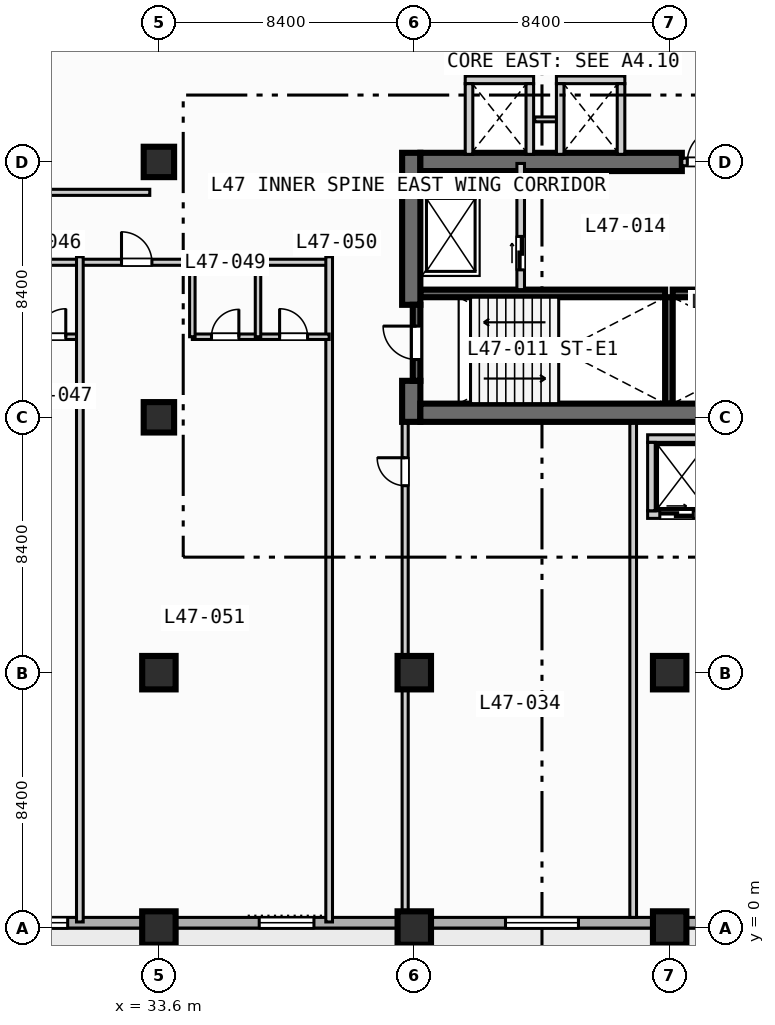
"""IFC4 building model, lengths in metres.
Left out: names, types, materials, properties, quantities, classifications, styles, units other than length and angle.
Written with IfcOpenShell. Run it as: python <this file> out.ifc"""

import sys

from ifc_helpers import new_model, si_unit, direction, frame, frame_2d, origin, origin_2d, place, context, subcontext, project, spatial, rectangle, extrude, element, fill, save


model = new_model("IFC4")
c1 = context("Model", 3, precision=1e-05, world=origin(), true_north=direction((0.0, 1.0)))
c2 = subcontext(c1, "Body", "Model", "MODEL_VIEW")
j1 = project(units=[si_unit("LENGTHUNIT", "METRE"), si_unit("PLANEANGLEUNIT", "RADIAN")], contexts=[c1])
p1 = place(None, origin())
s1 = spatial("IfcSite", under=j1, at=p1, CompositionType="ELEMENT")
p2 = place(p1, origin())
s2 = spatial("IfcBuilding", under=s1, at=p2, CompositionType="ELEMENT")
p3 = place(p2, frame((0.0, 0.0, 193.9)))
s3 = spatial("IfcBuildingStorey", under=s2, at=p3, CompositionType="ELEMENT", Elevation=193.9)
for number, where, z_axis, x_axis in (
    (1, (42.2, 20.875, 0.0), (0.0, 0.0, 1.0), (1.0, 0.0, 0.0)),
    (2, (50.5, 20.875, 0.0), (0.0, 0.0, 1.0), (1.0, 0.0, 0.0)),
):
    element("IfcWall", number, at=place(p3, frame(where, z_axis=z_axis, x_axis=x_axis)), inside=s3, PredefinedType="SOLIDWALL", context=c2, shape_type="SweptSolid", body=[
        extrude(rectangle(XDim=8.05, YDim=0.25, at=frame_2d((4.025, 0.0))), origin(), (0.0, 0.0, 1.0), 3.47),
    ])
p4 = place(p3, frame((50.375, 17.25, 0.0), z_axis=(0.0, 0.0, 1.0), x_axis=(0.0, 1.0, 0.0)))
e3 = element("IfcWall", 3, at=p4, inside=s3, PredefinedType="SOLIDWALL", context=c2, shape_type="SweptSolid", body=[
    extrude(rectangle(XDim=3.5, YDim=0.25, at=frame_2d((1.75, 0.0))), origin(), (0.0, 0.0, 1.0), 3.47),
])
p5 = place(p3, frame((41.9, 16.65, 0.0), z_axis=(0.0, 0.0, 1.0), x_axis=(0.0, 1.0, 0.0)))
e4 = element("IfcWall", 4, at=p5, inside=s3, PredefinedType="SHEAR", context=c2, shape_type="SweptSolid", body=[
    extrude(rectangle(XDim=1.35, YDim=0.6, at=frame_2d((0.675, 0.0))), origin(), (0.0, 0.0, 1.0), 3.47),
])
p6 = place(p3, frame((41.9, 20.5, 0.0), z_axis=(0.0, 0.0, 1.0), x_axis=(0.0, 1.0, 0.0)))
e5 = element("IfcWall", 5, at=p6, inside=s3, PredefinedType="SHEAR", context=c2, shape_type="SweptSolid", body=[
    extrude(rectangle(XDim=5.0, YDim=0.6, at=frame_2d((2.5, 0.0))), origin(), (0.0, 0.0, 1.0), 3.47),
])
p7 = place(p3, frame((42.2, 16.95, 0.0), z_axis=(0.0, 0.0, 1.0), x_axis=(1.0, 0.0, 0.0)))
e6 = element("IfcWall", 6, at=p7, inside=s3, PredefinedType="SHEAR", context=c2, shape_type="SweptSolid", body=[
    extrude(rectangle(XDim=16.35, YDim=0.6, at=frame_2d((8.175, 0.0))), origin(), (0.0, 0.0, 1.0), 3.47),
])
p8 = place(p3, frame((42.2, 25.2, 0.0), z_axis=(0.0, 0.0, 1.0), x_axis=(1.0, 0.0, 0.0)))
e7 = element("IfcWall", 7, at=p8, inside=s3, PredefinedType="SHEAR", context=c2, shape_type="SweptSolid", body=[
    extrude(rectangle(XDim=8.6, YDim=0.6, at=frame_2d((4.3, 0.0))), origin(), (0.0, 0.0, 1.0), 3.47),
])
for number, where, z_axis, x_axis in (
    (8, (33.6, 0.0, 0.0), (0.0, 0.0, 1.0), (1.0, 0.0, 0.0)),
    (9, (33.6, 8.4, 0.0), (0.0, 0.0, 1.0), (1.0, 0.0, 0.0)),
):
    element("IfcColumn", number, at=place(p3, frame(where, z_axis=z_axis, x_axis=x_axis)), inside=s3, PredefinedType="COLUMN", context=c2, shape_type="SweptSolid", body=[
        extrude(rectangle(XDim=1.1, YDim=1.1, at=origin_2d()), origin(), (0.0, 0.0, 1.0), 3.7),
    ])
for number, where, z_axis, x_axis in (
    (10, (33.6, 16.8, 0.0), (0.0, 0.0, 1.0), (1.0, 0.0, 0.0)),
    (11, (33.6, 25.2, 0.0), (0.0, 0.0, 1.0), (1.0, 0.0, 0.0)),
):
    element("IfcColumn", number, at=place(p3, frame(where, z_axis=z_axis, x_axis=x_axis)), inside=s3, PredefinedType="COLUMN", context=c2, shape_type="SweptSolid", body=[
        extrude(rectangle(XDim=1.0, YDim=1.0, at=origin_2d()), origin(), (0.0, 0.0, 1.0), 3.7),
    ])
for number, where, z_axis, x_axis in (
    (12, (42.0, 0.0, 0.0), (0.0, 0.0, 1.0), (1.0, 0.0, 0.0)),
    (13, (42.0, 8.4, 0.0), (0.0, 0.0, 1.0), (1.0, 0.0, 0.0)),
    (14, (50.4, 0.0, 0.0), (0.0, 0.0, 1.0), (1.0, 0.0, 0.0)),
    (15, (50.4, 8.4, 0.0), (0.0, 0.0, 1.0), (1.0, 0.0, 0.0)),
):
    element("IfcColumn", number, at=place(p3, frame(where, z_axis=z_axis, x_axis=x_axis)), inside=s3, PredefinedType="COLUMN", context=c2, shape_type="SweptSolid", body=[
        extrude(rectangle(XDim=1.1, YDim=1.1, at=origin_2d()), origin(), (0.0, 0.0, 1.0), 3.7),
    ])
p9 = place(p3, frame((72.425, 0.175, 0.0), z_axis=(0.0, 0.0, 1.0), x_axis=(-1.0, 0.0, 0.0)))
e16 = element("IfcWall", 16, at=p9, inside=s3, PredefinedType="STANDARD", context=c2, shape_type="SweptSolid", body=[
    extrude(rectangle(XDim=69.25, YDim=0.35, at=frame_2d((34.625, 0.0))), origin(), (0.0, 0.0, 1.0), 3.47),
])
p10 = place(p9, frame((50.725, 0.0, 0.0)))
e17 = element("IfcOpeningElement", 17, at=p10, cuts=e16, PredefinedType="OPENING", context=c2, shape_type="SweptSolid", body=[
    extrude(rectangle(XDim=1.4, YDim=2.2, at=frame_2d((0.7, 1.1))), frame((0.0, 0.185, 0.0), z_axis=(0.0, -1.0, 0.0), x_axis=(1.0, 0.0, 0.0)), (0.0, 0.0, 1.0), 0.37),
])
p11 = place(p9, frame((58.625, 0.0, 0.85)))
e18 = element("IfcOpeningElement", 18, at=p11, cuts=e16, PredefinedType="OPENING", context=c2, shape_type="SweptSolid", body=[
    extrude(rectangle(XDim=2.4, YDim=1.95, at=frame_2d((1.2, 0.975))), frame((0.0, 0.185, 0.0), z_axis=(0.0, -1.0, 0.0), x_axis=(1.0, 0.0, 0.0)), (0.0, 0.0, 1.0), 0.37),
])
p12 = place(p9, frame((41.825, 0.0, 0.85)))
e19 = element("IfcOpeningElement", 19, at=p12, cuts=e16, PredefinedType="OPENING", context=c2, shape_type="SweptSolid", body=[
    extrude(rectangle(XDim=2.4, YDim=1.95, at=frame_2d((1.2, 0.975))), frame((0.0, 0.185, 0.0), z_axis=(0.0, -1.0, 0.0), x_axis=(1.0, 0.0, 0.0)), (0.0, 0.0, 1.0), 0.37),
])
p13 = place(p9, frame((33.725, 0.0, 0.85)))
e20 = element("IfcOpeningElement", 20, at=p13, cuts=e16, PredefinedType="OPENING", context=c2, shape_type="SweptSolid", body=[
    extrude(rectangle(XDim=1.8, YDim=1.8, at=frame_2d((0.9, 0.9))), frame((0.0, 0.185, 0.0), z_axis=(0.0, -1.0, 0.0), x_axis=(1.0, 0.0, 0.0)), (0.0, 0.0, 1.0), 0.37),
])
p14 = place(p9, frame((25.025, 0.0, 0.85)))
e21 = element("IfcOpeningElement", 21, at=p14, cuts=e16, PredefinedType="OPENING", context=c2, shape_type="SweptSolid", body=[
    extrude(rectangle(XDim=2.4, YDim=1.95, at=frame_2d((1.2, 0.975))), frame((0.0, 0.185, 0.0), z_axis=(0.0, -1.0, 0.0), x_axis=(1.0, 0.0, 0.0)), (0.0, 0.0, 1.0), 0.37),
])
p15 = place(p9, frame((64.875, 0.0, 0.85)))
e22 = element("IfcOpeningElement", 22, at=p15, cuts=e16, PredefinedType="OPENING", context=c2, shape_type="SweptSolid", body=[
    extrude(rectangle(XDim=1.8, YDim=1.8, at=frame_2d((0.9, 0.9))), frame((0.0, 0.185, 0.0), z_axis=(0.0, -1.0, 0.0), x_axis=(1.0, 0.0, 0.0)), (0.0, 0.0, 1.0), 0.37),
])
p16 = place(p3, frame((42.075, 18.0, 0.0), z_axis=(0.0, 0.0, 1.0), x_axis=(0.0, 1.0, 0.0)))
e23 = element("IfcWall", 23, at=p16, inside=s3, PredefinedType="SOLIDWALL", context=c2, shape_type="SweptSolid", body=[
    extrude(rectangle(XDim=2.5, YDim=0.25, at=frame_2d((1.25, 0.0))), origin(), (0.0, 0.0, 1.0), 3.47),
])
p17 = place(p16, frame((0.7, 0.0, 0.0)))
e24 = element("IfcOpeningElement", 24, at=p17, cuts=e23, PredefinedType="OPENING", context=c2, shape_type="SweptSolid", body=[
    extrude(rectangle(XDim=1.1, YDim=2.15, at=frame_2d((0.55, 1.075))), frame((0.0, 0.135, 0.0), z_axis=(0.0, -1.0, 0.0), x_axis=(1.0, 0.0, 0.0)), (0.0, 0.0, 1.0), 0.27),
])
p18 = place(p3, frame((45.5, 21.0, 0.0), z_axis=(0.0, 0.0, 1.0), x_axis=(0.0, 1.0, 0.0)))
e25 = element("IfcWall", 25, at=p18, inside=s3, PredefinedType="SOLIDWALL", context=c2, shape_type="SweptSolid", body=[
    extrude(rectangle(XDim=4.15, YDim=0.25, at=frame_2d((2.075, 0.0))), origin(), (0.0, 0.0, 1.0), 3.47),
])
p19 = place(p18, frame((0.65, 0.0, 0.0)))
e26 = element("IfcOpeningElement", 26, at=p19, cuts=e25, PredefinedType="OPENING", context=c2, shape_type="SweptSolid", body=[
    extrude(rectangle(XDim=1.1, YDim=2.15, at=frame_2d((0.55, 1.075))), frame((0.0, 0.135, 0.0), z_axis=(0.0, -1.0, 0.0), x_axis=(1.0, 0.0, 0.0)), (0.0, 0.0, 1.0), 0.27),
])
p20 = place(p3, frame((50.8, 25.2, 0.0), z_axis=(0.0, 0.0, 1.0), x_axis=(1.0, 0.0, 0.0)))
e27 = element("IfcWall", 27, at=p20, inside=s3, PredefinedType="SOLIDWALL", context=c2, shape_type="SweptSolid", body=[
    extrude(rectangle(XDim=1.48, YDim=0.25, at=frame_2d((0.74, 0.0))), origin(), (0.0, 0.0, 1.0), 3.47),
])
p21 = place(p20, frame((0.18, 0.0, 0.0)))
e28 = element("IfcOpeningElement", 28, at=p21, cuts=e27, PredefinedType="OPENING", context=c2, shape_type="SweptSolid", body=[
    extrude(rectangle(XDim=1.1, YDim=2.15, at=frame_2d((0.55, 1.075))), frame((0.0, 0.135, 0.0), z_axis=(0.0, -1.0, 0.0), x_axis=(1.0, 0.0, 0.0)), (0.0, 0.0, 1.0), 0.27),
])
p22 = place(p3, frame((49.675, 13.6, 0.0), z_axis=(0.0, 0.0, 1.0), x_axis=(1.0, 0.0, 0.0)))
e29 = element("IfcWall", 29, at=p22, inside=s3, PredefinedType="SOLIDWALL", context=c2, shape_type="SweptSolid", body=[
    extrude(rectangle(XDim=2.25, YDim=0.25, at=frame_2d((1.125, 0.0))), origin(), (0.0, 0.0, 1.0), 3.47),
])
p23 = place(p22, frame((0.4, 0.0, 0.0)))
e30 = element("IfcOpeningElement", 30, at=p23, cuts=e29, PredefinedType="OPENING", context=c2, shape_type="SweptSolid", body=[
    extrude(rectangle(XDim=1.1, YDim=2.15, at=frame_2d((0.55, 1.075))), frame((0.0, 0.135, 0.0), z_axis=(0.0, -1.0, 0.0), x_axis=(1.0, 0.0, 0.0)), (0.0, 0.0, 1.0), 0.27),
])
for number, where, z_axis, x_axis in (
    (31, (49.675, 16.1, 0.0), (0.0, 0.0, 1.0), (1.0, 0.0, 0.0)),
    (32, (49.8, 13.725, 0.0), (0.0, 0.0, 1.0), (0.0, 1.0, 0.0)),
    (33, (43.675, 27.9, 0.0), (0.0, 0.0, 1.0), (1.0, 0.0, 0.0)),
):
    element("IfcWall", number, at=place(p3, frame(where, z_axis=z_axis, x_axis=x_axis)), inside=s3, PredefinedType="SOLIDWALL", context=c2, shape_type="SweptSolid", body=[
        extrude(rectangle(XDim=2.25, YDim=0.25, at=frame_2d((1.125, 0.0))), origin(), (0.0, 0.0, 1.0), 3.47),
    ])
for number, where, z_axis, x_axis in (
    (34, (43.8, 25.45, 0.0), (0.0, 0.0, 1.0), (0.0, 1.0, 0.0)),
    (35, (45.8, 25.45, 0.0), (0.0, 0.0, 1.0), (0.0, 1.0, 0.0)),
):
    element("IfcWall", number, at=place(p3, frame(where, z_axis=z_axis, x_axis=x_axis)), inside=s3, PredefinedType="SOLIDWALL", context=c2, shape_type="SweptSolid", body=[
        extrude(rectangle(XDim=2.325, YDim=0.25, at=frame_2d((1.163, 0.0))), origin(), (0.0, 0.0, 1.0), 3.47),
    ])
p24 = place(p3, frame((45.96, 26.6, 0.0), z_axis=(0.0, 0.0, 1.0), x_axis=(1.0, 0.0, 0.0)))
e36 = element("IfcWall", 36, at=p24, inside=s3, PredefinedType="PARTITIONING", context=c2, shape_type="SweptSolid", body=[
    extrude(rectangle(XDim=0.88, YDim=0.16, at=frame_2d((0.44, 0.0))), origin(), (0.0, 0.0, 1.0), 3.47),
])
p25 = place(p3, frame((46.675, 27.9, 0.0), z_axis=(0.0, 0.0, 1.0), x_axis=(1.0, 0.0, 0.0)))
e37 = element("IfcWall", 37, at=p25, inside=s3, PredefinedType="SOLIDWALL", context=c2, shape_type="SweptSolid", body=[
    extrude(rectangle(XDim=2.25, YDim=0.25, at=frame_2d((1.125, 0.0))), origin(), (0.0, 0.0, 1.0), 3.47),
])
for number, where, z_axis, x_axis in (
    (38, (46.8, 25.45, 0.0), (0.0, 0.0, 1.0), (0.0, 1.0, 0.0)),
    (39, (48.8, 25.45, 0.0), (0.0, 0.0, 1.0), (0.0, 1.0, 0.0)),
):
    element("IfcWall", number, at=place(p3, frame(where, z_axis=z_axis, x_axis=x_axis)), inside=s3, PredefinedType="SOLIDWALL", context=c2, shape_type="SweptSolid", body=[
        extrude(rectangle(XDim=2.325, YDim=0.25, at=frame_2d((1.163, 0.0))), origin(), (0.0, 0.0, 1.0), 3.47),
    ])
p26 = place(p3, frame((41.7, 0.35, 0.0), z_axis=(0.0, 0.0, 1.0), x_axis=(0.0, 1.0, 0.0)))
e40 = element("IfcWall", 40, at=p26, inside=s3, PredefinedType="PARTITIONING", context=c2, shape_type="SweptSolid", body=[
    extrude(rectangle(XDim=16.25, YDim=0.2, at=frame_2d((8.125, 0.0))), origin(), (0.0, 0.0, 1.0), 2.82),
])
p27 = place(p26, frame((14.2, 0.0, 0.0)))
e41 = element("IfcOpeningElement", 41, at=p27, cuts=e40, PredefinedType="OPENING", context=c2, shape_type="SweptSolid", body=[
    extrude(rectangle(XDim=0.92, YDim=2.1, at=frame_2d((0.46, 1.05))), frame((0.0, 0.11, 0.0), z_axis=(0.0, -1.0, 0.0), x_axis=(1.0, 0.0, 0.0)), (0.0, 0.0, 1.0), 0.22),
])
p28 = place(p3, frame((49.2, 0.35, 0.0), z_axis=(0.0, 0.0, 1.0), x_axis=(0.0, 1.0, 0.0)))
e42 = element("IfcWall", 42, at=p28, inside=s3, PredefinedType="PARTITIONING", context=c2, shape_type="SweptSolid", body=[
    extrude(rectangle(XDim=16.25, YDim=0.22, at=frame_2d((8.125, 0.0))), origin(), (0.0, 0.0, 1.0), 3.47),
])
p29 = place(p3, frame((21.6, 24.2, 0.0), z_axis=(0.0, 0.0, 1.0), x_axis=(1.0, 0.0, 0.0)))
e43 = element("IfcWall", 43, at=p29, inside=s3, PredefinedType="PARTITIONING", context=c2, shape_type="SweptSolid", body=[
    extrude(rectangle(XDim=11.7, YDim=0.2, at=frame_2d((5.85, 0.0))), origin(), (0.0, 0.0, 1.0), 3.47),
])
p30 = place(p3, frame((3.4, 21.9, 0.0), z_axis=(0.0, 0.0, 1.0), x_axis=(1.0, 0.0, 0.0)))
e44 = element("IfcWall", 44, at=p30, inside=s3, PredefinedType="PARTITIONING", context=c2, shape_type="SweptSolid", body=[
    extrude(rectangle(XDim=35.8, YDim=0.2, at=frame_2d((17.9, 0.0))), origin(), (0.0, 0.0, 1.0), 3.47),
])
p31 = place(p30, frame((0.97, 0.0, 0.0)))
e45 = element("IfcOpeningElement", 45, at=p31, cuts=e44, PredefinedType="OPENING", context=c2, shape_type="SweptSolid", body=[
    extrude(rectangle(XDim=1.0, YDim=2.15, at=frame_2d((0.5, 1.075))), frame((0.0, 0.11, 0.0), z_axis=(0.0, -1.0, 0.0), x_axis=(1.0, 0.0, 0.0)), (0.0, 0.0, 1.0), 0.22),
])
p32 = place(p30, frame((7.97, 0.0, 0.0)))
e46 = element("IfcOpeningElement", 46, at=p32, cuts=e44, PredefinedType="OPENING", context=c2, shape_type="SweptSolid", body=[
    extrude(rectangle(XDim=1.0, YDim=2.15, at=frame_2d((0.5, 1.075))), frame((0.0, 0.11, 0.0), z_axis=(0.0, -1.0, 0.0), x_axis=(1.0, 0.0, 0.0)), (0.0, 0.0, 1.0), 0.22),
])
p33 = place(p30, frame((15.37, 0.0, 0.0)))
e47 = element("IfcOpeningElement", 47, at=p33, cuts=e44, PredefinedType="OPENING", context=c2, shape_type="SweptSolid", body=[
    extrude(rectangle(XDim=1.0, YDim=2.15, at=frame_2d((0.5, 1.075))), frame((0.0, 0.11, 0.0), z_axis=(0.0, -1.0, 0.0), x_axis=(1.0, 0.0, 0.0)), (0.0, 0.0, 1.0), 0.22),
])
p34 = place(p30, frame((22.645, 0.0, 0.0)))
e48 = element("IfcOpeningElement", 48, at=p34, cuts=e44, PredefinedType="OPENING", context=c2, shape_type="SweptSolid", body=[
    extrude(rectangle(XDim=1.0, YDim=2.15, at=frame_2d((0.5, 1.075))), frame((0.0, 0.11, 0.0), z_axis=(0.0, -1.0, 0.0), x_axis=(1.0, 0.0, 0.0)), (0.0, 0.0, 1.0), 0.22),
])
p35 = place(p30, frame((28.97, 0.0, 0.0)))
e49 = element("IfcOpeningElement", 49, at=p35, cuts=e44, PredefinedType="OPENING", context=c2, shape_type="SweptSolid", body=[
    extrude(rectangle(XDim=1.0, YDim=2.15, at=frame_2d((0.5, 1.075))), frame((0.0, 0.11, 0.0), z_axis=(0.0, -1.0, 0.0), x_axis=(1.0, 0.0, 0.0)), (0.0, 0.0, 1.0), 0.22),
])
p36 = place(p3, frame((27.45, 19.45, 0.0), z_axis=(0.0, 0.0, 1.0), x_axis=(1.0, 0.0, 0.0)))
e50 = element("IfcWall", 50, at=p36, inside=s3, PredefinedType="PLUMBINGWALL", context=c2, shape_type="SweptSolid", body=[
    extrude(rectangle(XDim=3.55, YDim=0.18, at=frame_2d((1.775, 0.0))), origin(), (0.0, 0.0, 1.0), 3.47),
])
p37 = place(p36, frame((0.402, 0.0, 0.0)))
e51 = element("IfcOpeningElement", 51, at=p37, cuts=e50, PredefinedType="OPENING", context=c2, shape_type="SweptSolid", body=[
    extrude(rectangle(XDim=0.9, YDim=2.1, at=frame_2d((0.45, 1.05))), frame((0.0, 0.1, 0.0), z_axis=(0.0, -1.0, 0.0), x_axis=(1.0, 0.0, 0.0)), (0.0, 0.0, 1.0), 0.2),
])
p38 = place(p36, frame((2.167, 0.0, 0.0)))
e52 = element("IfcOpeningElement", 52, at=p38, cuts=e50, PredefinedType="OPENING", context=c2, shape_type="SweptSolid", body=[
    extrude(rectangle(XDim=0.92, YDim=2.1, at=frame_2d((0.46, 1.05))), frame((0.0, 0.1, 0.0), z_axis=(0.0, -1.0, 0.0), x_axis=(1.0, 0.0, 0.0)), (0.0, 0.0, 1.0), 0.2),
])
for number, where, z_axis, x_axis in (
    (53, (31.0, 0.2, 0.0), (0.0, 0.0, 1.0), (0.0, 1.0, 0.0)),
    (54, (39.2, 0.2, 0.0), (0.0, 0.0, 1.0), (0.0, 1.0, 0.0)),
):
    element("IfcWall", number, at=place(p3, frame(where, z_axis=z_axis, x_axis=x_axis)), inside=s3, PredefinedType="PARTITIONING", context=c2, shape_type="SweptSolid", body=[
        extrude(rectangle(XDim=21.88, YDim=0.22, at=frame_2d((10.94, 0.0))), origin(), (0.0, 0.0, 1.0), 3.47),
    ])
p39 = place(p3, frame((34.7, 19.45, 0.0), z_axis=(0.0, 0.0, 1.0), x_axis=(1.0, 0.0, 0.0)))
e55 = element("IfcWall", 55, at=p39, inside=s3, PredefinedType="PLUMBINGWALL", context=c2, shape_type="SweptSolid", body=[
    extrude(rectangle(XDim=4.5, YDim=0.18, at=frame_2d((2.25, 0.0))), origin(), (0.0, 0.0, 1.0), 3.47),
])
p40 = place(p39, frame((0.63, 0.0, 0.0)))
e56 = element("IfcOpeningElement", 56, at=p40, cuts=e55, PredefinedType="OPENING", context=c2, shape_type="SweptSolid", body=[
    extrude(rectangle(XDim=0.9, YDim=2.1, at=frame_2d((0.45, 1.05))), frame((0.0, 0.1, 0.0), z_axis=(0.0, -1.0, 0.0), x_axis=(1.0, 0.0, 0.0)), (0.0, 0.0, 1.0), 0.2),
])
p41 = place(p39, frame((2.87, 0.0, 0.0)))
e57 = element("IfcOpeningElement", 57, at=p41, cuts=e55, PredefinedType="OPENING", context=c2, shape_type="SweptSolid", body=[
    extrude(rectangle(XDim=0.92, YDim=2.1, at=frame_2d((0.46, 1.05))), frame((0.0, 0.1, 0.0), z_axis=(0.0, -1.0, 0.0), x_axis=(1.0, 0.0, 0.0)), (0.0, 0.0, 1.0), 0.2),
])
for number, where, z_axis, x_axis in (
    (58, (34.7, 19.45, 0.0), (0.0, 0.0, 1.0), (0.0, 1.0, 0.0)),
    (59, (36.86, 19.45, 0.0), (0.0, 0.0, 1.0), (0.0, 1.0, 0.0)),
):
    element("IfcWall", number, at=place(p3, frame(where, z_axis=z_axis, x_axis=x_axis)), inside=s3, PredefinedType="PLUMBINGWALL", context=c2, shape_type="SweptSolid", body=[
        extrude(rectangle(XDim=2.45, YDim=0.18, at=frame_2d((1.225, 0.0))), origin(), (0.0, 0.0, 1.0), 3.47),
    ])
p42 = place(p12, origin())
e60 = element("IfcWindow", 60, at=p42, inside=s3, PartitioningType="SINGLE_PANEL", PredefinedType="WINDOW", context=c2, shape_type="SweptSolid", body=[
    extrude(rectangle(XDim=2.4, YDim=1.95, at=frame_2d((1.2, 0.975))), frame((0.0, 0.03, 0.0), z_axis=(0.0, -1.0, 0.0), x_axis=(1.0, 0.0, 0.0)), (0.0, 0.0, 1.0), 0.06),
])
fill(e19, e60)
p43 = place(p13, origin())
e61 = element("IfcWindow", 61, at=p43, inside=s3, PartitioningType="SINGLE_PANEL", PredefinedType="WINDOW", context=c2, shape_type="SweptSolid", body=[
    extrude(rectangle(XDim=1.8, YDim=1.8, at=frame_2d((0.9, 0.9))), frame((0.0, 0.03, 0.0), z_axis=(0.0, -1.0, 0.0), x_axis=(1.0, 0.0, 0.0)), (0.0, 0.0, 1.0), 0.06),
])
fill(e20, e61)
p44 = place(p14, origin())
e62 = element("IfcWindow", 62, at=p44, inside=s3, PartitioningType="SINGLE_PANEL", PredefinedType="WINDOW", context=c2, shape_type="SweptSolid", body=[
    extrude(rectangle(XDim=2.4, YDim=1.95, at=frame_2d((1.2, 0.975))), frame((0.0, 0.03, 0.0), z_axis=(0.0, -1.0, 0.0), x_axis=(1.0, 0.0, 0.0)), (0.0, 0.0, 1.0), 0.06),
])
fill(e21, e62)
p45 = place(p17, origin())
e63 = element("IfcDoor", 63, at=p45, inside=s3, OperationType="SINGLE_SWING_RIGHT", PredefinedType="DOOR", context=c2, shape_type="SweptSolid", body=[
    extrude(rectangle(XDim=1.1, YDim=2.15, at=frame_2d((0.55, 1.075))), frame((0.0, 0.025, 0.0), z_axis=(0.0, -1.0, 0.0), x_axis=(1.0, 0.0, 0.0)), (0.0, 0.0, 1.0), 0.05),
])
fill(e24, e63)
p46 = place(p19, origin())
e64 = element("IfcDoor", 64, at=p46, inside=s3, OperationType="SLIDING_TO_LEFT", PredefinedType="DOOR", context=c2, shape_type="SweptSolid", body=[
    extrude(rectangle(XDim=1.1, YDim=2.15, at=frame_2d((0.55, 1.075))), frame((0.0, 0.025, 0.0), z_axis=(0.0, -1.0, 0.0), x_axis=(1.0, 0.0, 0.0)), (0.0, 0.0, 1.0), 0.05),
])
fill(e26, e64)
p47 = place(p21, origin())
e65 = element("IfcDoor", 65, at=p47, inside=s3, OperationType="SINGLE_SWING_RIGHT", PredefinedType="DOOR", context=c2, shape_type="SweptSolid", body=[
    extrude(rectangle(XDim=1.1, YDim=2.15, at=frame_2d((0.55, 1.075))), frame((0.0, 0.025, 0.0), z_axis=(0.0, -1.0, 0.0), x_axis=(1.0, 0.0, 0.0)), (0.0, 0.0, 1.0), 0.05),
])
fill(e28, e65)
p48 = place(p23, origin())
e66 = element("IfcDoor", 66, at=p48, inside=s3, OperationType="SLIDING_TO_LEFT", PredefinedType="DOOR", context=c2, shape_type="SweptSolid", body=[
    extrude(rectangle(XDim=1.1, YDim=2.15, at=frame_2d((0.55, 1.075))), frame((0.0, 0.025, 0.0), z_axis=(0.0, -1.0, 0.0), x_axis=(1.0, 0.0, 0.0)), (0.0, 0.0, 1.0), 0.05),
])
fill(e30, e66)
p49 = place(p27, origin())
e67 = element("IfcDoor", 67, at=p49, inside=s3, OperationType="SINGLE_SWING_RIGHT", PredefinedType="DOOR", context=c2, shape_type="SweptSolid", body=[
    extrude(rectangle(XDim=0.92, YDim=2.1, at=frame_2d((0.46, 1.05))), frame((0.0, 0.025, 0.0), z_axis=(0.0, -1.0, 0.0), x_axis=(1.0, 0.0, 0.0)), (0.0, 0.0, 1.0), 0.05),
])
fill(e41, e67)
p50 = place(p35, origin())
e68 = element("IfcDoor", 68, at=p50, inside=s3, OperationType="SINGLE_SWING_LEFT", PredefinedType="DOOR", context=c2, shape_type="SweptSolid", body=[
    extrude(rectangle(XDim=1.0, YDim=2.15, at=frame_2d((0.5, 1.075))), frame((0.0, 0.025, 0.0), z_axis=(0.0, -1.0, 0.0), x_axis=(1.0, 0.0, 0.0)), (0.0, 0.0, 1.0), 0.05),
])
fill(e49, e68)
p51 = place(p38, origin())
e69 = element("IfcDoor", 69, at=p51, inside=s3, OperationType="SINGLE_SWING_RIGHT", PredefinedType="DOOR", context=c2, shape_type="SweptSolid", body=[
    extrude(rectangle(XDim=0.92, YDim=2.1, at=frame_2d((0.46, 1.05))), frame((0.0, 0.025, 0.0), z_axis=(0.0, -1.0, 0.0), x_axis=(1.0, 0.0, 0.0)), (0.0, 0.0, 1.0), 0.05),
])
fill(e52, e69)
p52 = place(p40, origin())
e70 = element("IfcDoor", 70, at=p52, inside=s3, OperationType="SINGLE_SWING_RIGHT", PredefinedType="DOOR", context=c2, shape_type="SweptSolid", body=[
    extrude(rectangle(XDim=0.9, YDim=2.1, at=frame_2d((0.45, 1.05))), frame((0.0, 0.025, 0.0), z_axis=(0.0, -1.0, 0.0), x_axis=(1.0, 0.0, 0.0)), (0.0, 0.0, 1.0), 0.05),
])
fill(e56, e70)
p53 = place(p41, origin())
e71 = element("IfcDoor", 71, at=p53, inside=s3, OperationType="SINGLE_SWING_LEFT", PredefinedType="DOOR", context=c2, shape_type="SweptSolid", body=[
    extrude(rectangle(XDim=0.92, YDim=2.1, at=frame_2d((0.46, 1.05))), frame((0.0, 0.025, 0.0), z_axis=(0.0, -1.0, 0.0), x_axis=(1.0, 0.0, 0.0)), (0.0, 0.0, 1.0), 0.05),
])
fill(e57, e71)
save(model, sys.argv[1])
